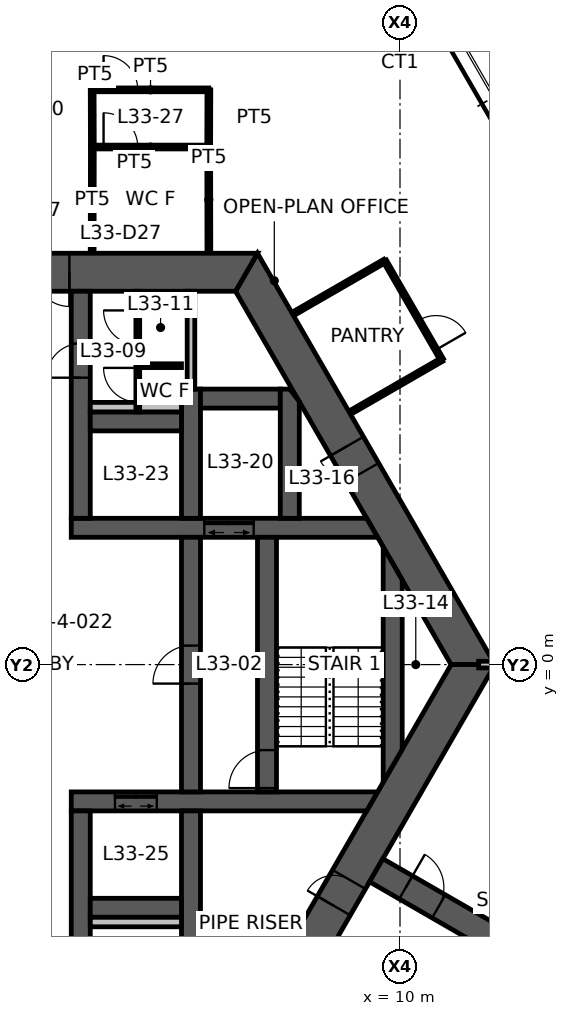
"""IFC4 building model, lengths in metres.
Left out: names, types, materials, properties, quantities, classifications, styles, units other than length and angle.
Written with IfcOpenShell. Run it as: python <this file> out.ifc"""

import sys

from ifc_helpers import new_model, si_unit, direction, frame, frame_2d, origin, place, context, subcontext, project, spatial, polyline, rectangle, outline, extrude, element, fill, save


model = new_model("IFC4")
c1 = context("Model", 3, precision=1e-05, world=origin(), true_north=direction((0.0, 1.0)))
c2 = subcontext(c1, "Body", "Model", "MODEL_VIEW")
j1 = project(units=[si_unit("LENGTHUNIT", "METRE"), si_unit("PLANEANGLEUNIT", "RADIAN")], contexts=[c1])
p1 = place(None, origin())
s1 = spatial("IfcSite", under=j1, at=p1, CompositionType="ELEMENT")
p2 = place(p1, origin())
s2 = spatial("IfcBuilding", under=s1, at=p2, CompositionType="ELEMENT")
p3 = place(p2, frame((0.0, 0.0, 133.1)))
s3 = spatial("IfcBuildingStorey", under=s2, at=p3, CompositionType="ELEMENT", Elevation=133.1)
p4 = place(p3, frame((11.922, 0.0, 0.0), z_axis=(0.0, 0.0, 1.0), x_axis=(-0.500004296715, 0.866022923061, 0.0)))
e1 = element("IfcWall", 1, at=p4, inside=s3, PredefinedType="SHEAR", context=c2, shape_type="SweptSolid", body=[
    extrude(outline(polyline([(-0.289, -0.5), (5.835, -0.5), (6.635, -0.5), (12.211, -0.5), (11.634, 0.5), (6.635, 0.5), (5.835, 0.5), (0.289, 0.5), (-0.289, -0.5)])), origin(), (0.0, 0.0, 1.0), 3.9),
])
p5 = place(p4, frame((5.835, 0.0, 0.0)))
e2 = element("IfcOpeningElement", 2, at=p5, cuts=e1, PredefinedType="OPENING", context=c2, shape_type="SweptSolid", body=[
    extrude(rectangle(XDim=0.8, YDim=2.1, at=frame_2d((0.4, 1.05))), frame((0.0, 0.51, 0.0), z_axis=(0.0, -1.0, 0.0), x_axis=(1.0, 0.0, 0.0)), (0.0, 0.0, 1.0), 1.02),
])
p6 = place(p3, frame((5.961, 10.325, 0.0), z_axis=(0.0, 0.0, 1.0), x_axis=(-1.0, 0.0, 0.0)))
e3 = element("IfcWall", 3, at=p6, inside=s3, PredefinedType="SHEAR", context=c2, shape_type="SweptSolid", body=[
    extrude(outline(polyline([(-0.289, -0.5), (4.661, -0.5), (5.561, -0.5), (6.361, -0.5), (7.261, -0.5), (12.211, -0.5), (11.634, 0.5), (7.261, 0.5), (6.361, 0.5), (5.561, 0.5), (4.661, 0.5), (0.289, 0.5), (-0.289, -0.5)])), origin(), (0.0, 0.0, 1.0), 3.9),
])
p7 = place(p6, frame((6.361, 0.0, 0.0)))
e4 = element("IfcOpeningElement", 4, at=p7, cuts=e3, PredefinedType="OPENING", context=c2, shape_type="SweptSolid", body=[
    extrude(rectangle(XDim=0.9, YDim=2.1, at=frame_2d((0.45, 1.05))), frame((0.0, 0.51, 0.0), z_axis=(0.0, -1.0, 0.0), x_axis=(1.0, 0.0, 0.0)), (0.0, 0.0, 1.0), 1.02),
])
p8 = place(p6, frame((4.661, 0.0, 0.0)))
e5 = element("IfcOpeningElement", 5, at=p8, cuts=e3, PredefinedType="OPENING", context=c2, shape_type="SweptSolid", body=[
    extrude(rectangle(XDim=0.9, YDim=2.1, at=frame_2d((0.45, 1.05))), frame((0.0, 0.51, 0.0), z_axis=(0.0, -1.0, 0.0), x_axis=(1.0, 0.0, 0.0)), (0.0, 0.0, 1.0), 1.02),
])
p9 = place(p3, frame((5.961, -10.325, 0.0), z_axis=(0.0, 0.0, 1.0), x_axis=(0.500004296715, 0.866022923061, 0.0)))
e6 = element("IfcWall", 6, at=p9, inside=s3, PredefinedType="SHEAR", context=c2, shape_type="SweptSolid", body=[
    extrude(outline(polyline([(-0.289, -0.5), (4.594, -0.5), (5.394, -0.5), (12.211, -0.5), (11.634, 0.5), (5.394, 0.5), (4.594, 0.5), (0.289, 0.5), (-0.289, -0.5)])), origin(), (0.0, 0.0, 1.0), 3.9),
])
p10 = place(p9, frame((4.594, 0.0, 0.0)))
e7 = element("IfcOpeningElement", 7, at=p10, cuts=e6, PredefinedType="OPENING", context=c2, shape_type="SweptSolid", body=[
    extrude(rectangle(XDim=0.8, YDim=2.1, at=frame_2d((0.4, 1.05))), frame((0.0, 0.51, 0.0), z_axis=(0.0, -1.0, 0.0), x_axis=(1.0, 0.0, 0.0)), (0.0, 0.0, 1.0), 1.02),
])
p11 = place(p3, frame((9.375, -5.413, 0.0), z_axis=(0.0, 0.0, 1.0), x_axis=(0.866032377459, -0.499987921047, 0.0)))
e8 = element("IfcWall", 8, at=p11, inside=s3, PredefinedType="SHEAR", context=c2, shape_type="SweptSolid", body=[
    extrude(rectangle(XDim=7.696, YDim=0.7, at=frame_2d((3.848, 0.0))), origin(), (0.0, 0.0, 1.0), 3.9),
])
p12 = place(p11, frame((0.9, 0.0, 0.0)))
e9 = element("IfcOpeningElement", 9, at=p12, cuts=e8, PredefinedType="OPENING", context=c2, shape_type="SweptSolid", body=[
    extrude(rectangle(XDim=1.0, YDim=2.1, at=frame_2d((0.5, 1.05))), frame((0.0, 0.36, 0.0), z_axis=(0.0, -1.0, 0.0), x_axis=(1.0, 0.0, 0.0)), (0.0, 0.0, 1.0), 0.72),
])
p13 = place(p3, frame((1.35, 3.6, 0.0), z_axis=(0.0, 0.0, 1.0), x_axis=(1.0, 0.0, 0.0)))
e10 = element("IfcWall", 10, at=p13, inside=s3, PredefinedType="SHEAR", context=c2, shape_type="SweptSolid", body=[
    extrude(outline(polyline([(0.0, -0.25), (3.5, -0.25), (4.8, -0.25), (8.061, -0.25), (7.772, 0.25), (4.8, 0.25), (3.5, 0.25), (0.0, 0.25), (0.0, -0.25)])), origin(), (0.0, 0.0, 1.0), 3.9),
])
p14 = place(p13, frame((3.5, 0.0, 0.0)))
e11 = element("IfcOpeningElement", 11, at=p14, cuts=e10, PredefinedType="OPENING", context=c2, shape_type="SweptSolid", body=[
    extrude(rectangle(XDim=1.3, YDim=2.1, at=frame_2d((0.65, 1.05))), frame((0.0, 0.26, 0.0), z_axis=(0.0, -1.0, 0.0), x_axis=(1.0, 0.0, 0.0)), (0.0, 0.0, 1.0), 0.52),
])
p15 = place(p3, frame((1.35, -3.6, 0.0), z_axis=(0.0, 0.0, 1.0), x_axis=(1.0, 0.0, 0.0)))
e12 = element("IfcWall", 12, at=p15, inside=s3, PredefinedType="SHEAR", context=c2, shape_type="SweptSolid", body=[
    extrude(outline(polyline([(0.0, -0.25), (1.15, -0.25), (2.25, -0.25), (7.772, -0.25), (8.061, 0.25), (2.25, 0.25), (1.15, 0.25), (0.0, 0.25), (0.0, -0.25)])), origin(), (0.0, 0.0, 1.0), 3.9),
])
p16 = place(p15, frame((1.15, 0.0, 0.0)))
e13 = element("IfcOpeningElement", 13, at=p16, cuts=e12, PredefinedType="OPENING", context=c2, shape_type="SweptSolid", body=[
    extrude(rectangle(XDim=1.1, YDim=2.1, at=frame_2d((0.55, 1.05))), frame((0.0, 0.26, 0.0), z_axis=(0.0, -1.0, 0.0), x_axis=(1.0, 0.0, 0.0)), (0.0, 0.0, 1.0), 0.52),
])
p17 = place(p3, frame((1.6, 3.85, 0.0), z_axis=(0.0, 0.0, 1.0), x_axis=(0.0, 1.0, 0.0)))
e14 = element("IfcWall", 14, at=p17, inside=s3, PredefinedType="SHEAR", context=c2, shape_type="SweptSolid", body=[
    extrude(rectangle(XDim=5.975, YDim=0.5, at=frame_2d((2.987, 0.0))), origin(), (0.0, 0.0, 1.0), 3.9),
])
p18 = place(p17, frame((3.7, 0.0, 0.0)))
e15 = element("IfcOpeningElement", 15, at=p18, cuts=e14, PredefinedType="OPENING", context=c2, shape_type="SweptSolid", body=[
    extrude(rectangle(XDim=0.9, YDim=2.1, at=frame_2d((0.45, 1.05))), frame((0.0, 0.26, 0.0), z_axis=(0.0, -1.0, 0.0), x_axis=(1.0, 0.0, 0.0)), (0.0, 0.0, 1.0), 0.52),
])
p19 = place(p3, frame((1.6, -3.85, 0.0), z_axis=(0.0, 0.0, 1.0), x_axis=(0.0, -1.0, 0.0)))
e16 = element("IfcWall", 16, at=p19, inside=s3, PredefinedType="SHEAR", context=c2, shape_type="SweptSolid", body=[
    extrude(rectangle(XDim=5.975, YDim=0.5, at=frame_2d((2.987, 0.0))), origin(), (0.0, 0.0, 1.0), 3.9),
])
p20 = place(p19, frame((3.55, 0.0, 0.0)))
e17 = element("IfcOpeningElement", 17, at=p20, cuts=e16, PredefinedType="OPENING", context=c2, shape_type="SweptSolid", body=[
    extrude(rectangle(XDim=1.2, YDim=2.1, at=frame_2d((0.6, 1.05))), frame((0.0, 0.26, 0.0), z_axis=(0.0, -1.0, 0.0), x_axis=(1.0, 0.0, 0.0)), (0.0, 0.0, 1.0), 0.52),
])
p21 = place(p3, frame((4.5, -3.35, 0.0), z_axis=(0.0, 0.0, 1.0), x_axis=(0.0, 1.0, 0.0)))
e18 = element("IfcWall", 18, at=p21, inside=s3, PredefinedType="SHEAR", context=c2, shape_type="SweptSolid", body=[
    extrude(rectangle(XDim=6.7, YDim=0.5, at=frame_2d((3.35, 0.0))), origin(), (0.0, 0.0, 1.0), 3.9),
])
p22 = place(p21, frame((2.85, 0.0, 0.0)))
e19 = element("IfcOpeningElement", 19, at=p22, cuts=e18, PredefinedType="OPENING", context=c2, shape_type="SweptSolid", body=[
    extrude(rectangle(XDim=1.0, YDim=2.1, at=frame_2d((0.5, 1.05))), frame((0.0, 0.26, 0.0), z_axis=(0.0, -1.0, 0.0), x_axis=(1.0, 0.0, 0.0)), (0.0, 0.0, 1.0), 0.52),
])
p23 = place(p3, frame((6.5, -3.35, 0.0), z_axis=(0.0, 0.0, 1.0), x_axis=(0.0, 1.0, 0.0)))
e20 = element("IfcWall", 20, at=p23, inside=s3, PredefinedType="SHEAR", context=c2, shape_type="SweptSolid", body=[
    extrude(rectangle(XDim=6.7, YDim=0.5, at=frame_2d((3.35, 0.0))), origin(), (0.0, 0.0, 1.0), 3.9),
])
p24 = place(p23, frame((0.1, 0.0, 0.0)))
e21 = element("IfcOpeningElement", 21, at=p24, cuts=e20, PredefinedType="OPENING", context=c2, shape_type="SweptSolid", body=[
    extrude(rectangle(XDim=1.0, YDim=2.1, at=frame_2d((0.5, 1.05))), frame((0.0, 0.26, 0.0), z_axis=(0.0, -1.0, 0.0), x_axis=(1.0, 0.0, 0.0)), (0.0, 0.0, 1.0), 0.52),
])
p25 = place(p3, frame((4.5, 3.85, 0.0), z_axis=(0.0, 0.0, 1.0), x_axis=(0.0, 1.0, 0.0)))
e22 = element("IfcWall", 22, at=p25, inside=s3, PredefinedType="SHEAR", context=c2, shape_type="SweptSolid", body=[
    extrude(rectangle(XDim=3.4, YDim=0.5, at=frame_2d((1.7, 0.0))), origin(), (0.0, 0.0, 1.0), 3.9),
])
p26 = place(p3, frame((4.5, -3.85, 0.0), z_axis=(0.0, 0.0, 1.0), x_axis=(0.0, -1.0, 0.0)))
e23 = element("IfcWall", 23, at=p26, inside=s3, PredefinedType="SHEAR", context=c2, shape_type="SweptSolid", body=[
    extrude(rectangle(XDim=5.975, YDim=0.5, at=frame_2d((2.987, 0.0))), origin(), (0.0, 0.0, 1.0), 3.9),
])
for number, where, z_axis, x_axis in (
    (24, (1.85, 6.4, 0.0), (0.0, 0.0, 1.0), (1.0, 0.0, 0.0)),
    (25, (1.85, -6.4, 0.0), (0.0, 0.0, 1.0), (1.0, 0.0, 0.0)),
):
    element("IfcWall", number, at=place(p3, frame(where, z_axis=z_axis, x_axis=x_axis)), inside=s3, PredefinedType="SHEAR", context=c2, shape_type="SweptSolid", body=[
        extrude(rectangle(XDim=2.4, YDim=0.5, at=frame_2d((1.2, 0.0))), origin(), (0.0, 0.0, 1.0), 3.9),
    ])
p27 = place(p3, frame((4.75, 7.0, 0.0), z_axis=(0.0, 0.0, 1.0), x_axis=(1.0, 0.0, 0.0)))
e26 = element("IfcWall", 26, at=p27, inside=s3, PredefinedType="SHEAR", context=c2, shape_type="SweptSolid", body=[
    extrude(rectangle(XDim=2.1, YDim=0.5, at=frame_2d((1.05, 0.0))), origin(), (0.0, 0.0, 1.0), 3.9),
])
p28 = place(p3, frame((7.1, 3.85, 0.0), z_axis=(0.0, 0.0, 1.0), x_axis=(0.0, 1.0, 0.0)))
e27 = element("IfcWall", 27, at=p28, inside=s3, PredefinedType="SHEAR", context=c2, shape_type="SweptSolid", body=[
    extrude(outline(polyline([(0.0, -0.25), (3.069, -0.25), (3.4, 0.0), (3.4, 0.25), (0.0, 0.25), (0.0, -0.25)])), origin(), (0.0, 0.0, 1.0), 3.9),
])
p29 = place(p3, frame((9.808, -2.662, 0.0), z_axis=(0.0, 0.0, 1.0), x_axis=(0.0, 1.0, 0.0)))
e28 = element("IfcWall", 28, at=p29, inside=s3, PredefinedType="SHEAR", context=c2, shape_type="SweptSolid", body=[
    extrude(outline(polyline([(0.433, -0.25), (4.892, -0.25), (5.758, 0.25), (-0.433, 0.25), (0.433, -0.25)])), origin(), (0.0, 0.0, 1.0), 3.9),
])
p30 = place(p3, frame((4.5, 7.25, 0.0), z_axis=(0.0, 0.0, 1.0), x_axis=(0.0, 1.0, 0.0)))
e29 = element("IfcWall", 29, at=p30, inside=s3, PredefinedType="STANDARD", context=c2, shape_type="SweptSolid", body=[
    extrude(rectangle(XDim=2.575, YDim=0.2, at=frame_2d((1.288, 0.0))), origin(), (0.0, 0.0, 1.0), 3.9),
])
for number, where, z_axis, x_axis in (
    (30, (1.85, 6.775, 0.0), (0.0, 0.0, 1.0), (1.0, 0.0, 0.0)),
    (31, (1.85, -6.775, 0.0), (0.0, 0.0, 1.0), (1.0, 0.0, 0.0)),
):
    element("IfcWall", number, at=place(p3, frame(where, z_axis=z_axis, x_axis=x_axis)), inside=s3, PredefinedType="PLUMBINGWALL", context=c2, shape_type="SweptSolid", body=[
        extrude(rectangle(XDim=2.4, YDim=0.25, at=frame_2d((1.2, 0.0))), origin(), (0.0, 0.0, 1.0), 3.9),
    ])
p31 = place(p3, frame((3.1, 6.65, 0.0), z_axis=(0.0, 0.0, 1.0), x_axis=(0.0, 1.0, 0.0)))
e32 = element("IfcWall", 32, at=p31, inside=s3, PredefinedType="PARTITIONING", context=c2, shape_type="SweptSolid", body=[
    extrude(rectangle(XDim=3.175, YDim=0.1, at=frame_2d((1.587, 0.0))), origin(), (0.0, 0.0, 1.0), 2.95),
])
p32 = place(p31, frame((0.258, 0.0, 0.0)))
e33 = element("IfcOpeningElement", 33, at=p32, cuts=e32, PredefinedType="OPENING", context=c2, shape_type="SweptSolid", body=[
    extrude(rectangle(XDim=0.9, YDim=2.1, at=frame_2d((0.45, 1.05))), frame((0.0, 0.06, 0.0), z_axis=(0.0, -1.0, 0.0), x_axis=(1.0, 0.0, 0.0)), (0.0, 0.0, 1.0), 0.12),
])
p33 = place(p31, frame((1.771, 0.0, 0.0)))
e34 = element("IfcOpeningElement", 34, at=p33, cuts=e32, PredefinedType="OPENING", context=c2, shape_type="SweptSolid", body=[
    extrude(rectangle(XDim=0.9, YDim=2.1, at=frame_2d((0.45, 1.05))), frame((0.0, 0.06, 0.0), z_axis=(0.0, -1.0, 0.0), x_axis=(1.0, 0.0, 0.0)), (0.0, 0.0, 1.0), 0.12),
])
p34 = place(p3, frame((3.15, 7.866, 0.0), z_axis=(0.0, 0.0, 1.0), x_axis=(1.0, 0.0, 0.0)))
e35 = element("IfcWall", 35, at=p34, inside=s3, PredefinedType="PARTITIONING", context=c2, shape_type="SweptSolid", body=[
    extrude(rectangle(XDim=1.1, YDim=0.1, at=frame_2d((0.55, 0.0))), origin(), (0.0, 0.0, 1.0), 2.95),
])
p35 = place(p3, frame((12.07, 0.0, 0.0), z_axis=(0.0, 0.0, 1.0), x_axis=(1.0, 0.0, 0.0)))
e36 = element("IfcWall", 36, at=p35, inside=s3, PredefinedType="PARTITIONING", context=c2, shape_type="SweptSolid", body=[
    extrude(rectangle(XDim=7.93, YDim=0.175, at=frame_2d((3.965, 0.0))), origin(), (0.0, 0.0, 1.0), 3.05),
])
p36 = place(p35, frame((1.13, 0.0, 0.0)))
e37 = element("IfcOpeningElement", 37, at=p36, cuts=e36, PredefinedType="OPENING", context=c2, shape_type="SweptSolid", body=[
    extrude(rectangle(XDim=1.0, YDim=2.1, at=frame_2d((0.5, 1.05))), frame((0.0, 0.098, 0.0), z_axis=(0.0, -1.0, 0.0), x_axis=(1.0, 0.0, 0.0)), (0.0, 0.0, 1.0), 0.195),
])
p37 = place(p3, frame((1.9, 13.62, 0.0), z_axis=(0.0, 0.0, 1.0), x_axis=(1.0, 0.0, 0.0)))
e38 = element("IfcWall", 38, at=p37, inside=s3, PredefinedType="PARTITIONING", context=c2, shape_type="SweptSolid", body=[
    extrude(rectangle(XDim=3.071, YDim=0.1, at=frame_2d((1.536, 0.0))), origin(), (0.0, 0.0, 1.0), 2.95),
])
p38 = place(p37, frame((0.3, 0.0, 0.0)))
e39 = element("IfcOpeningElement", 39, at=p38, cuts=e38, PredefinedType="OPENING", context=c2, shape_type="SweptSolid", body=[
    extrude(rectangle(XDim=0.9, YDim=2.1, at=frame_2d((0.45, 1.05))), frame((0.0, 0.06, 0.0), z_axis=(0.0, -1.0, 0.0), x_axis=(1.0, 0.0, 0.0)), (0.0, 0.0, 1.0), 0.12),
])
for number, where, z_axis, x_axis in (
    (40, (1.9, 10.845, 0.0), (0.0, 0.0, 1.0), (0.002, 1.0, 0.0)),
    (41, (4.966, 13.625, 0.0), (0.0, 0.0, 1.0), (0.002, -1.0, 0.0)),
):
    element("IfcWall", number, at=place(p3, frame(where, z_axis=z_axis, x_axis=x_axis)), inside=s3, PredefinedType="PARTITIONING", context=c2, shape_type="SweptSolid", body=[
        extrude(rectangle(XDim=2.78, YDim=0.1, at=frame_2d((1.39, 0.0))), origin(), (0.0, 0.0, 1.0), 2.95),
    ])
p39 = place(p3, frame((1.9, 15.125, 0.0), z_axis=(0.0, 0.0, 1.0), x_axis=(1.0, 0.0, 0.0)))
e42 = element("IfcWall", 42, at=p39, inside=s3, PredefinedType="PARTITIONING", context=c2, shape_type="SweptSolid", body=[
    extrude(rectangle(XDim=3.071, YDim=0.1, at=frame_2d((1.536, 0.0))), origin(), (0.0, 0.0, 1.0), 2.95),
])
p40 = place(p39, frame((0.3, 0.0, 0.0)))
e43 = element("IfcOpeningElement", 43, at=p40, cuts=e42, PredefinedType="OPENING", context=c2, shape_type="SweptSolid", body=[
    extrude(rectangle(XDim=0.9, YDim=2.1, at=frame_2d((0.45, 1.05))), frame((0.0, 0.06, 0.0), z_axis=(0.0, -1.0, 0.0), x_axis=(1.0, 0.0, 0.0)), (0.0, 0.0, 1.0), 0.12),
])
for number, where, z_axis, x_axis in (
    (44, (1.905, 13.625, 0.0), (0.0, 0.0, 1.0), (-0.003, 1.0, 0.0)),
    (45, (4.971, 15.125, 0.0), (0.0, 0.0, 1.0), (-0.003, -1.0, 0.0)),
):
    element("IfcWall", number, at=place(p3, frame(where, z_axis=z_axis, x_axis=x_axis)), inside=s3, PredefinedType="PARTITIONING", context=c2, shape_type="SweptSolid", body=[
        extrude(rectangle(XDim=1.5, YDim=0.1, at=frame_2d((0.75, 0.0))), origin(), (0.0, 0.0, 1.0), 2.95),
    ])
p41 = place(p3, frame((7.192, 9.233, 0.0), z_axis=(0.0, 0.0, 1.0), x_axis=(0.866018876994, 0.500011304563, 0.0)))
e46 = element("IfcWall", 46, at=p41, inside=s3, PredefinedType="PARTITIONING", context=c2, shape_type="SweptSolid", body=[
    extrude(rectangle(XDim=2.78, YDim=0.1, at=frame_2d((1.39, 0.0))), origin(), (0.0, 0.0, 1.0), 2.95),
])
p42 = place(p3, frame((9.6, 10.623, 0.0), z_axis=(0.0, 0.0, 1.0), x_axis=(0.499990139034, -0.866031096941, 0.0)))
e47 = element("IfcWall", 47, at=p42, inside=s3, PredefinedType="PARTITIONING", context=c2, shape_type="SweptSolid", body=[
    extrude(rectangle(XDim=3.0, YDim=0.1, at=frame_2d((1.5, 0.0))), origin(), (0.0, 0.0, 1.0), 2.95),
])
p43 = place(p42, frame((1.8, 0.0, 0.0)))
e48 = element("IfcOpeningElement", 48, at=p43, cuts=e47, PredefinedType="OPENING", context=c2, shape_type="SweptSolid", body=[
    extrude(rectangle(XDim=0.9, YDim=2.1, at=frame_2d((0.45, 1.05))), frame((0.0, 0.06, 0.0), z_axis=(0.0, -1.0, 0.0), x_axis=(1.0, 0.0, 0.0)), (0.0, 0.0, 1.0), 0.12),
])
p44 = place(p3, frame((11.1, 8.025, 0.0), z_axis=(0.0, 0.0, 1.0), x_axis=(-0.866056901187, -0.49994544093, 0.0)))
e49 = element("IfcWall", 49, at=p44, inside=s3, PredefinedType="PARTITIONING", context=c2, shape_type="SweptSolid", body=[
    extrude(rectangle(XDim=2.78, YDim=0.1, at=frame_2d((1.39, 0.0))), origin(), (0.0, 0.0, 1.0), 2.95),
])
p45 = place(p8, origin())
e50 = element("IfcDoor", 50, at=p45, inside=s3, OperationType="SINGLE_SWING_LEFT", PredefinedType="DOOR", context=c2, shape_type="SweptSolid", body=[
    extrude(rectangle(XDim=0.9, YDim=2.1, at=frame_2d((0.45, 1.05))), frame((0.0, 0.025, 0.0), z_axis=(0.0, -1.0, 0.0), x_axis=(1.0, 0.0, 0.0)), (0.0, 0.0, 1.0), 0.05),
])
fill(e5, e50)
p46 = place(p5, origin())
e51 = element("IfcDoor", 51, at=p46, inside=s3, OperationType="SINGLE_SWING_RIGHT", PredefinedType="DOOR", context=c2, shape_type="SweptSolid", body=[
    extrude(rectangle(XDim=0.8, YDim=2.1, at=frame_2d((0.4, 1.05))), frame((0.0, 0.025, 0.0), z_axis=(0.0, -1.0, 0.0), x_axis=(1.0, 0.0, 0.0)), (0.0, 0.0, 1.0), 0.05),
])
fill(e2, e51)
p47 = place(p10, origin())
e52 = element("IfcDoor", 52, at=p47, inside=s3, OperationType="SINGLE_SWING_LEFT", PredefinedType="DOOR", context=c2, shape_type="SweptSolid", body=[
    extrude(rectangle(XDim=0.8, YDim=2.1, at=frame_2d((0.4, 1.05))), frame((0.0, 0.025, 0.0), z_axis=(0.0, -1.0, 0.0), x_axis=(1.0, 0.0, 0.0)), (0.0, 0.0, 1.0), 0.05),
])
fill(e7, e52)
p48 = place(p22, origin())
e53 = element("IfcDoor", 53, at=p48, inside=s3, OperationType="SINGLE_SWING_LEFT", PredefinedType="DOOR", context=c2, shape_type="SweptSolid", body=[
    extrude(rectangle(XDim=1.0, YDim=2.1, at=frame_2d((0.5, 1.05))), frame((0.0, 0.025, 0.0), z_axis=(0.0, -1.0, 0.0), x_axis=(1.0, 0.0, 0.0)), (0.0, 0.0, 1.0), 0.05),
])
fill(e19, e53)
p49 = place(p24, origin())
e54 = element("IfcDoor", 54, at=p49, inside=s3, OperationType="SINGLE_SWING_LEFT", PredefinedType="DOOR", context=c2, shape_type="SweptSolid", body=[
    extrude(rectangle(XDim=1.0, YDim=2.1, at=frame_2d((0.5, 1.05))), frame((0.0, 0.025, 0.0), z_axis=(0.0, -1.0, 0.0), x_axis=(1.0, 0.0, 0.0)), (0.0, 0.0, 1.0), 0.05),
])
fill(e21, e54)
p50 = place(p18, origin())
e55 = element("IfcDoor", 55, at=p50, inside=s3, OperationType="SINGLE_SWING_LEFT", PredefinedType="DOOR", context=c2, shape_type="SweptSolid", body=[
    extrude(rectangle(XDim=0.9, YDim=2.1, at=frame_2d((0.45, 1.05))), frame((0.0, 0.025, 0.0), z_axis=(0.0, -1.0, 0.0), x_axis=(1.0, 0.0, 0.0)), (0.0, 0.0, 1.0), 0.05),
])
fill(e15, e55)
p51 = place(p12, origin())
e56 = element("IfcDoor", 56, at=p51, inside=s3, OperationType="SINGLE_SWING_LEFT", PredefinedType="DOOR", context=c2, shape_type="SweptSolid", body=[
    extrude(rectangle(XDim=1.0, YDim=2.1, at=frame_2d((0.5, 1.05))), frame((0.0, 0.025, 0.0), z_axis=(0.0, -1.0, 0.0), x_axis=(1.0, 0.0, 0.0)), (0.0, 0.0, 1.0), 0.05),
])
fill(e9, e56)
p52 = place(p32, origin())
e57 = element("IfcDoor", 57, at=p52, inside=s3, OperationType="SINGLE_SWING_RIGHT", PredefinedType="DOOR", context=c2, shape_type="SweptSolid", body=[
    extrude(rectangle(XDim=0.9, YDim=2.1, at=frame_2d((0.45, 1.05))), frame((0.0, 0.025, 0.0), z_axis=(0.0, -1.0, 0.0), x_axis=(1.0, 0.0, 0.0)), (0.0, 0.0, 1.0), 0.05),
])
fill(e33, e57)
p53 = place(p33, origin())
e58 = element("IfcDoor", 58, at=p53, inside=s3, OperationType="SINGLE_SWING_RIGHT", PredefinedType="DOOR", context=c2, shape_type="SweptSolid", body=[
    extrude(rectangle(XDim=0.9, YDim=2.1, at=frame_2d((0.45, 1.05))), frame((0.0, 0.025, 0.0), z_axis=(0.0, -1.0, 0.0), x_axis=(1.0, 0.0, 0.0)), (0.0, 0.0, 1.0), 0.05),
])
fill(e34, e58)
p54 = place(p38, origin())
e59 = element("IfcDoor", 59, at=p54, inside=s3, OperationType="SINGLE_SWING_LEFT", PredefinedType="DOOR", context=c2, shape_type="SweptSolid", body=[
    extrude(rectangle(XDim=0.9, YDim=2.1, at=frame_2d((0.45, 1.05))), frame((0.0, 0.025, 0.0), z_axis=(0.0, -1.0, 0.0), x_axis=(1.0, 0.0, 0.0)), (0.0, 0.0, 1.0), 0.05),
])
fill(e39, e59)
p55 = place(p40, origin())
e60 = element("IfcDoor", 60, at=p55, inside=s3, OperationType="SINGLE_SWING_LEFT", PredefinedType="DOOR", context=c2, shape_type="SweptSolid", body=[
    extrude(rectangle(XDim=0.9, YDim=2.1, at=frame_2d((0.45, 1.05))), frame((0.0, 0.025, 0.0), z_axis=(0.0, -1.0, 0.0), x_axis=(1.0, 0.0, 0.0)), (0.0, 0.0, 1.0), 0.05),
])
fill(e43, e60)
p56 = place(p43, origin())
e61 = element("IfcDoor", 61, at=p56, inside=s3, OperationType="SINGLE_SWING_RIGHT", PredefinedType="DOOR", context=c2, shape_type="SweptSolid", body=[
    extrude(rectangle(XDim=0.9, YDim=2.1, at=frame_2d((0.45, 1.05))), frame((0.0, 0.025, 0.0), z_axis=(0.0, -1.0, 0.0), x_axis=(1.0, 0.0, 0.0)), (0.0, 0.0, 1.0), 0.05),
])
fill(e48, e61)
p57 = place(p16, origin())
e62 = element("IfcDoor", 62, at=p57, inside=s3, OperationType="DOUBLE_DOOR_SLIDING", PredefinedType="DOOR", context=c2, shape_type="SweptSolid", body=[
    extrude(rectangle(XDim=1.1, YDim=2.1, at=frame_2d((0.55, 1.05))), frame((0.0, 0.025, 0.0), z_axis=(0.0, -1.0, 0.0), x_axis=(1.0, 0.0, 0.0)), (0.0, 0.0, 1.0), 0.05),
])
fill(e13, e62)
p58 = place(p14, origin())
e63 = element("IfcDoor", 63, at=p58, inside=s3, OperationType="DOUBLE_DOOR_SLIDING", PredefinedType="DOOR", context=c2, shape_type="SweptSolid", body=[
    extrude(rectangle(XDim=1.3, YDim=2.1, at=frame_2d((0.65, 1.05))), frame((0.0, 0.025, 0.0), z_axis=(0.0, -1.0, 0.0), x_axis=(1.0, 0.0, 0.0)), (0.0, 0.0, 1.0), 0.05),
])
fill(e11, e63)
save(model, sys.argv[1])
